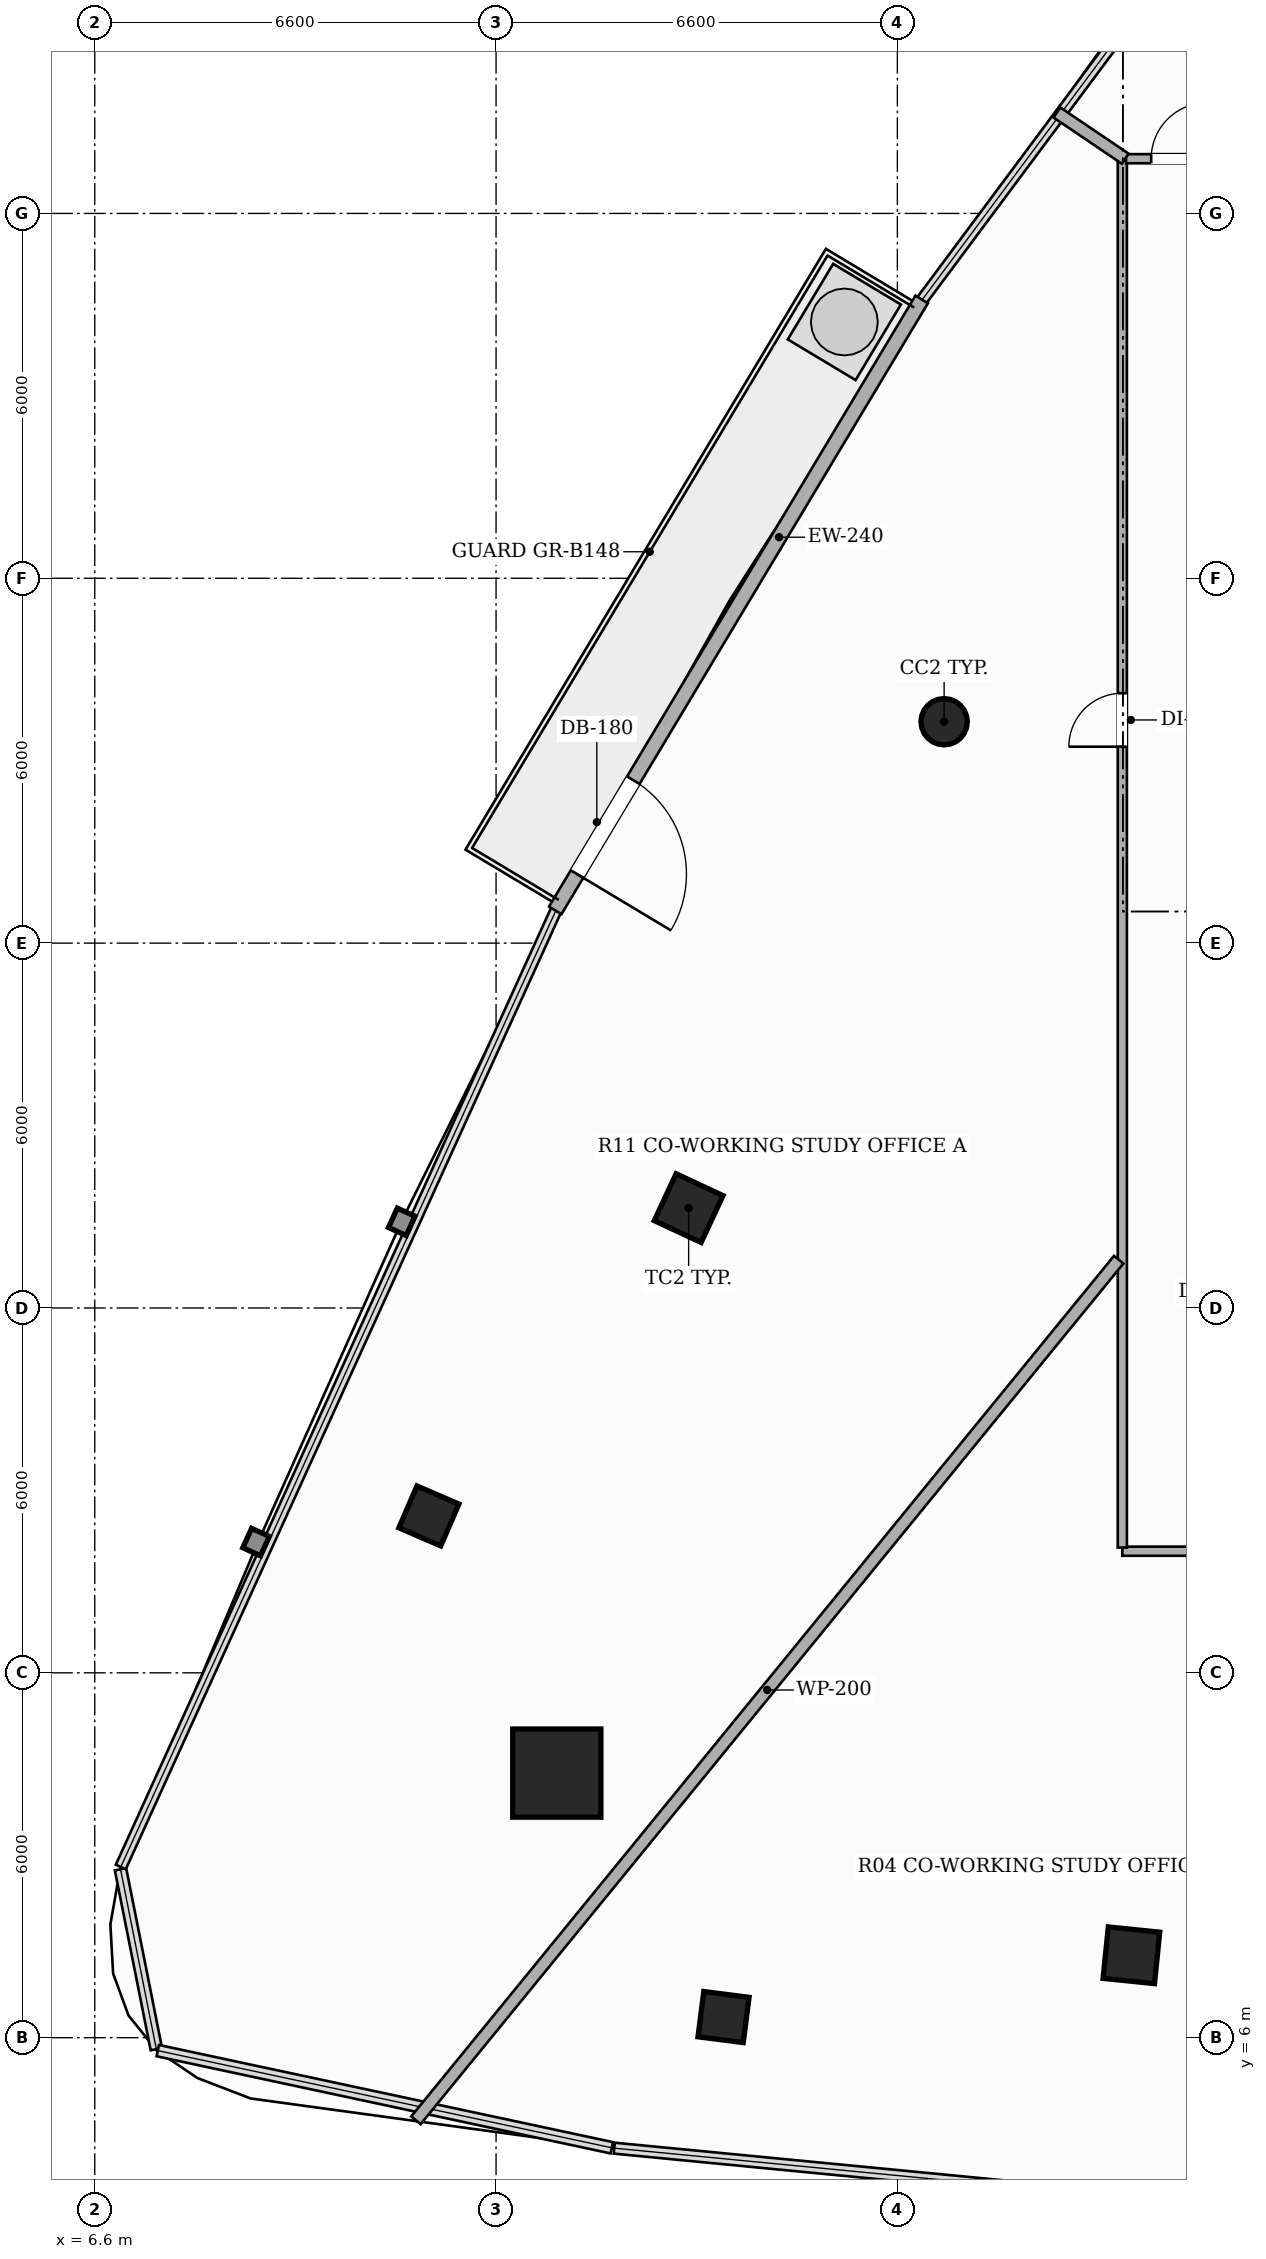
"""IFC4 building model, lengths in metres.
Left out: names, types, materials, properties, quantities, classifications, styles, units other than length and angle.
Written with IfcOpenShell. Run it as: python <this file> out.ifc"""

import sys

from ifc_helpers import new_model, si_unit, direction, frame, frame_2d, origin, origin_2d, place, context, subcontext, project, spatial, rectangle, hollow_rectangle, hollow_circle, extrude, element, fill, save


model = new_model("IFC4")
c1 = context("Model", 3, precision=1e-05, world=origin(), true_north=direction((0.0, 1.0)))
c2 = subcontext(c1, "Body", "Model", "MODEL_VIEW")
j1 = project(units=[si_unit("LENGTHUNIT", "METRE"), si_unit("PLANEANGLEUNIT", "RADIAN")], contexts=[c1])
p1 = place(None, origin())
s1 = spatial("IfcSite", under=j1, at=p1, CompositionType="ELEMENT")
p2 = place(p1, origin())
s2 = spatial("IfcBuilding", under=s1, at=p2, CompositionType="ELEMENT")
p3 = place(p2, frame((0.0, 0.0, 119.9)))
s3 = spatial("IfcBuildingStorey", under=s2, at=p3, CompositionType="ELEMENT", Elevation=119.9)
p4 = place(p3, frame((14.199, 10.351, 0.0), z_axis=(0.0, 0.0, 1.0), x_axis=(1.0, 0.0, 0.0)))
e1 = element("IfcColumn", 1, at=p4, inside=s3, PredefinedType="COLUMN", context=c2, shape_type="SweptSolid", body=[
    extrude(hollow_rectangle(XDim=1.45, YDim=1.45, WallThickness=0.045, at=origin_2d()), origin(), (0.0, 0.0, 1.0), 3.3),
])
p5 = place(p3, frame((20.569, 27.641, 0.0), z_axis=(0.0, 0.0, 1.0), x_axis=(1.0, 0.0, 0.0)))
e2 = element("IfcColumn", 2, at=p5, inside=s3, PredefinedType="COLUMN", context=c2, shape_type="SweptSolid", body=[
    extrude(hollow_circle(Radius=0.381, WallThickness=0.022, at=origin_2d()), origin(), (0.0, 0.0, 1.0), 3.3),
])
for number, where, z_axis, x_axis in (
    (3, (16.367, 19.642, 0.0), (0.0, 0.0, 1.0), (0.423, 0.906, 0.0)),
    (4, (23.649, 7.355, 0.0), (0.0, 0.0, 1.0), (-0.995, 0.101, 0.0)),
):
    element("IfcColumn", number, at=place(p3, frame(where, z_axis=z_axis, x_axis=x_axis)), inside=s3, PredefinedType="COLUMN", context=c2, shape_type="SweptSolid", body=[
        extrude(hollow_rectangle(XDim=0.85, YDim=0.85, WallThickness=0.028, at=origin_2d()), origin(), (0.0, 0.0, 1.0), 3.3),
    ])
for number, where, z_axis, x_axis in (
    (5, (12.095, 14.58, 0.0), (0.0, 0.0, 1.0), (0.397, 0.918, 0.0)),
    (6, (16.941, 6.339, 0.0), (0.0, 0.0, 1.0), (-0.992, 0.127, 0.0)),
):
    element("IfcColumn", number, at=place(p3, frame(where, z_axis=z_axis, x_axis=x_axis)), inside=s3, PredefinedType="COLUMN", context=c2, shape_type="SweptSolid", body=[
        extrude(hollow_rectangle(XDim=0.75, YDim=0.75, WallThickness=0.025, at=origin_2d()), origin(), (0.0, 0.0, 1.0), 3.3),
    ])
p6 = place(p3, frame((20.2, 34.586, 0.0), z_axis=(0.0, 0.0, 1.0), x_axis=(-0.514379309275, -0.857562782652, 0.0)))
e7 = element("IfcWall", 7, at=p6, inside=s3, PredefinedType="SOLIDWALL", context=c2, shape_type="SweptSolid", body=[
    extrude(rectangle(XDim=11.717, YDim=0.24, at=frame_2d((5.858, 0.0))), origin(), (0.0, 0.0, 1.0), 2.624),
])
p7 = place(p6, frame((9.22, 0.0, 0.0)))
e8 = element("IfcOpeningElement", 8, at=p7, cuts=e7, PredefinedType="OPENING", context=c2, shape_type="SweptSolid", body=[
    extrude(rectangle(XDim=1.8, YDim=2.2, at=frame_2d((0.9, 1.1))), frame((0.0, 0.13, 0.0), z_axis=(0.0, -1.0, 0.0), x_axis=(1.0, 0.0, 0.0)), (0.0, 0.0, 1.0), 0.26),
])
p8 = place(p3, frame((26.09, 14.0, 0.0), z_axis=(0.0, 0.0, 1.0), x_axis=(-1.0, 0.0, 0.0)))
e9 = element("IfcWall", 9, at=p8, inside=s3, PredefinedType="PARTITIONING", context=c2, shape_type="SweptSolid", body=[
    extrude(rectangle(XDim=2.59, YDim=0.15, at=frame_2d((1.295, 0.0))), origin(), (0.0, 0.0, 1.0), 2.721),
])
p9 = place(p3, frame((23.5, 14.06, 0.0), z_axis=(0.0, 0.0, 1.0), x_axis=(0.0, 1.0, 0.0)))
e10 = element("IfcWall", 10, at=p9, inside=s3, PredefinedType="PARTITIONING", context=c2, shape_type="SweptSolid", body=[
    extrude(rectangle(XDim=22.84, YDim=0.15, at=frame_2d((11.42, 0.0))), origin(), (0.0, 0.0, 1.0), 2.413),
])
p10 = place(p9, frame((13.17, 0.0, 0.0)))
e11 = element("IfcOpeningElement", 11, at=p10, cuts=e10, PredefinedType="OPENING", context=c2, shape_type="SweptSolid", body=[
    extrude(rectangle(XDim=0.88, YDim=2.1, at=frame_2d((0.44, 1.05))), frame((0.0, 0.085, 0.0), z_axis=(0.0, -1.0, 0.0), x_axis=(1.0, 0.0, 0.0)), (0.0, 0.0, 1.0), 0.17),
])
p11 = place(p3, frame((23.56, 36.9, 0.0), z_axis=(0.0, 0.0, 1.0), x_axis=(1.0, 0.0, 0.0)))
e12 = element("IfcWall", 12, at=p11, inside=s3, PredefinedType="PARTITIONING", context=c2, shape_type="SweptSolid", body=[
    extrude(rectangle(XDim=2.59, YDim=0.15, at=frame_2d((1.295, 0.0))), origin(), (0.0, 0.0, 1.0), 2.413),
])
p12 = place(p11, frame((0.414, 0.0, 0.0)))
e13 = element("IfcOpeningElement", 13, at=p12, cuts=e12, PredefinedType="OPENING", context=c2, shape_type="SweptSolid", body=[
    extrude(rectangle(XDim=0.92, YDim=2.15, at=frame_2d((0.46, 1.075))), frame((0.0, 0.085, 0.0), z_axis=(0.0, -1.0, 0.0), x_axis=(1.0, 0.0, 0.0)), (0.0, 0.0, 1.0), 0.17),
])
p13 = place(p3, frame((23.44, 18.794, 0.0), z_axis=(0.0, 0.0, 1.0), x_axis=(-0.632525219644, -0.774539764321, 0.0)))
e14 = element("IfcWall", 14, at=p13, inside=s3, PredefinedType="PARTITIONING", context=c2, shape_type="SweptSolid", body=[
    extrude(rectangle(XDim=18.272, YDim=0.2, at=frame_2d((9.136, 0.0))), origin(), (0.0, 0.0, 1.0), 2.413),
])
p14 = place(p3, frame((22.424, 37.66, 0.0), z_axis=(0.0, 0.0, 1.0), x_axis=(0.82818018374, -0.560461937388, 0.0)))
e15 = element("IfcWall", 15, at=p14, inside=s3, PredefinedType="PARTITIONING", context=c2, shape_type="SweptSolid", body=[
    extrude(rectangle(XDim=1.356, YDim=0.2, at=frame_2d((0.678, 0.0))), origin(), (0.0, 0.0, 1.0), 3.06),
])
p15 = place(p7, origin())
e16 = element("IfcDoor", 16, at=p15, inside=s3, OperationType="SINGLE_SWING_RIGHT", PredefinedType="DOOR", context=c2, shape_type="SweptSolid", body=[
    extrude(rectangle(XDim=1.8, YDim=2.2, at=frame_2d((0.9, 1.1))), frame((0.0, 0.025, 0.0), z_axis=(0.0, -1.0, 0.0), x_axis=(1.0, 0.0, 0.0)), (0.0, 0.0, 1.0), 0.05),
])
fill(e8, e16)
p16 = place(p10, origin())
e17 = element("IfcDoor", 17, at=p16, inside=s3, OperationType="SINGLE_SWING_LEFT", PredefinedType="DOOR", context=c2, shape_type="SweptSolid", body=[
    extrude(rectangle(XDim=0.88, YDim=2.1, at=frame_2d((0.44, 1.05))), frame((0.0, 0.025, 0.0), z_axis=(0.0, -1.0, 0.0), x_axis=(1.0, 0.0, 0.0)), (0.0, 0.0, 1.0), 0.05),
])
fill(e11, e17)
p17 = place(p12, origin())
e18 = element("IfcDoor", 18, at=p17, inside=s3, OperationType="SINGLE_SWING_RIGHT", PredefinedType="DOOR", context=c2, shape_type="SweptSolid", body=[
    extrude(rectangle(XDim=0.92, YDim=2.15, at=frame_2d((0.46, 1.075))), frame((0.0, 0.025, 0.0), z_axis=(0.0, -1.0, 0.0), x_axis=(1.0, 0.0, 0.0)), (0.0, 0.0, 1.0), 0.05),
])
fill(e13, e18)
save(model, sys.argv[1])
